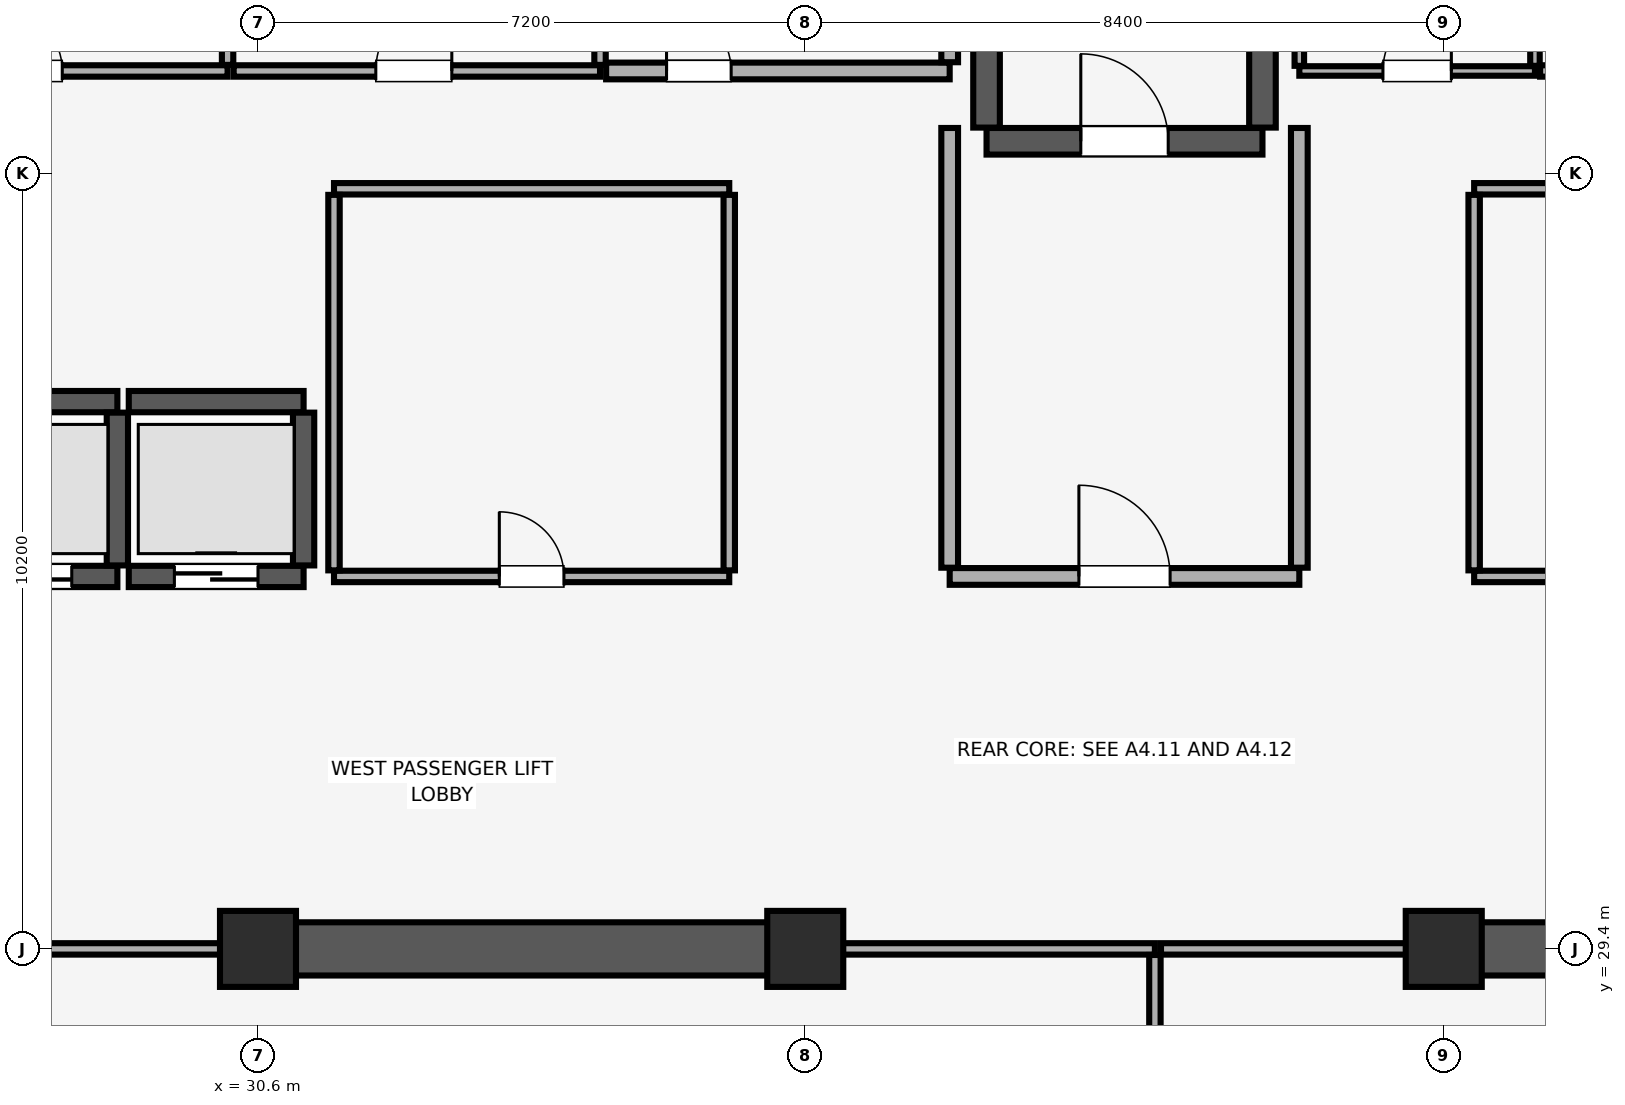
"""IFC4 building model, lengths in metres.
Left out: names, types, materials, properties, quantities, classifications, styles, units other than length and angle.
Written with IfcOpenShell. Run it as: python <this file> out.ifc"""

import sys

from ifc_helpers import new_model, si_unit, direction, frame, frame_2d, origin, origin_2d, place, context, subcontext, project, spatial, rectangle, extrude, element, fill, save


model = new_model("IFC4")
c1 = context("Model", 3, precision=1e-05, world=origin(), true_north=direction((0.0, 1.0)))
c2 = subcontext(c1, "Body", "Model", "MODEL_VIEW")
j1 = project(units=[si_unit("LENGTHUNIT", "METRE"), si_unit("PLANEANGLEUNIT", "RADIAN")], contexts=[c1])
p1 = place(None, origin())
s1 = spatial("IfcSite", under=j1, at=p1, CompositionType="ELEMENT")
p2 = place(p1, origin())
s2 = spatial("IfcBuilding", under=s1, at=p2, CompositionType="ELEMENT")
p3 = place(p2, frame((0.0, 0.0, 285.9)))
s3 = spatial("IfcBuildingStorey", under=s2, at=p3, CompositionType="ELEMENT", Elevation=285.9)
for number, where, z_axis, x_axis in (
    (1, (30.6, 29.4, 0.0), (0.0, 0.0, 1.0), (1.0, 0.0, 0.0)),
    (2, (37.8, 29.4, 0.0), (0.0, 0.0, 1.0), (1.0, 0.0, 0.0)),
    (3, (46.2, 29.4, 0.0), (0.0, 0.0, 1.0), (1.0, 0.0, 0.0)),
):
    element("IfcColumn", number, at=place(p3, frame(where, z_axis=z_axis, x_axis=x_axis)), inside=s3, PredefinedType="COLUMN", context=c2, shape_type="SweptSolid", body=[
        extrude(rectangle(XDim=1.0, YDim=1.0, at=origin_2d()), origin(), (0.0, 0.0, 1.0), 4.1),
    ])
for number, where, z_axis, x_axis in (
    (4, (30.4, 29.4, 0.0), (0.0, 0.0, 1.0), (1.0, 0.0, 0.0)),
    (5, (46.0, 29.4, 0.0), (0.0, 0.0, 1.0), (1.0, 0.0, 0.0)),
):
    element("IfcWall", number, at=place(p3, frame(where, z_axis=z_axis, x_axis=x_axis)), inside=s3, PredefinedType="SHEAR", context=c2, shape_type="SweptSolid", body=[
        extrude(rectangle(XDim=7.6, YDim=0.7, at=frame_2d((3.8, 0.0))), origin(), (0.0, 0.0, 1.0), 4.1),
    ])
p4 = place(p3, frame((40.185, 40.025, 0.0), z_axis=(0.0, 0.0, 1.0), x_axis=(1.0, 0.0, 0.0)))
e6 = element("IfcWall", 6, at=p4, inside=s3, PredefinedType="SHEAR", context=c2, shape_type="SweptSolid", body=[
    extrude(rectangle(XDim=3.63, YDim=0.35, at=frame_2d((1.815, 0.0))), origin(), (0.0, 0.0, 1.0), 4.1),
])
p5 = place(p4, frame((1.24, 0.0, 0.0)))
e7 = element("IfcOpeningElement", 7, at=p5, cuts=e6, PredefinedType="OPENING", context=c2, shape_type="SweptSolid", body=[
    extrude(rectangle(XDim=1.15, YDim=2.15, at=frame_2d((0.575, 1.075))), frame((0.0, 0.185, 0.0), z_axis=(0.0, -1.0, 0.0), x_axis=(1.0, 0.0, 0.0)), (0.0, 0.0, 1.0), 0.37),
])
for number, where, z_axis, x_axis in (
    (8, (40.185, 40.205, 0.0), (0.0, 0.0, 1.0), (0.0, 1.0, 0.0)),
    (9, (43.815, 40.205, 0.0), (0.0, 0.0, 1.0), (0.0, 1.0, 0.0)),
):
    element("IfcWall", number, at=place(p3, frame(where, z_axis=z_axis, x_axis=x_axis)), inside=s3, PredefinedType="SHEAR", context=c2, shape_type="SweptSolid", body=[
        extrude(rectangle(XDim=8.09, YDim=0.35, at=frame_2d((4.045, 0.0))), origin(), (0.0, 0.0, 1.0), 4.1),
    ])
p6 = place(p3, frame((26.45, 34.3, 0.0), z_axis=(0.0, 0.0, 1.0), x_axis=(1.0, 0.0, 0.0)))
e10 = element("IfcWall", 10, at=p6, inside=s3, PredefinedType="SHEAR", context=c2, shape_type="SweptSolid", body=[
    extrude(rectangle(XDim=2.3, YDim=0.28, at=frame_2d((1.15, 0.0))), origin(), (0.0, 0.0, 1.0), 4.1),
])
p7 = place(p6, frame((0.6, 0.0, 0.0)))
e11 = element("IfcOpeningElement", 11, at=p7, cuts=e10, PredefinedType="OPENING", context=c2, shape_type="SweptSolid", body=[
    extrude(rectangle(XDim=1.1, YDim=2.2, at=frame_2d((0.55, 1.1))), frame((0.0, 0.15, 0.0), z_axis=(0.0, -1.0, 0.0), x_axis=(1.0, 0.0, 0.0)), (0.0, 0.0, 1.0), 0.3),
])
p8 = place(p3, frame((26.45, 36.6, 0.0), z_axis=(0.0, 0.0, 1.0), x_axis=(1.0, 0.0, 0.0)))
e12 = element("IfcWall", 12, at=p8, inside=s3, PredefinedType="SHEAR", context=c2, shape_type="SweptSolid", body=[
    extrude(rectangle(XDim=2.3, YDim=0.28, at=frame_2d((1.15, 0.0))), origin(), (0.0, 0.0, 1.0), 4.1),
])
p9 = place(p3, frame((28.75, 34.445, 0.0), z_axis=(0.0, 0.0, 1.0), x_axis=(0.0, 1.0, 0.0)))
e13 = element("IfcWall", 13, at=p9, inside=s3, PredefinedType="SHEAR", context=c2, shape_type="SweptSolid", body=[
    extrude(rectangle(XDim=2.01, YDim=0.28, at=frame_2d((1.005, 0.0))), origin(), (0.0, 0.0, 1.0), 4.1),
])
p10 = place(p3, frame((28.9, 34.3, 0.0), z_axis=(0.0, 0.0, 1.0), x_axis=(1.0, 0.0, 0.0)))
e14 = element("IfcWall", 14, at=p10, inside=s3, PredefinedType="SHEAR", context=c2, shape_type="SweptSolid", body=[
    extrude(rectangle(XDim=2.3, YDim=0.28, at=frame_2d((1.15, 0.0))), origin(), (0.0, 0.0, 1.0), 4.1),
])
p11 = place(p10, frame((0.6, 0.0, 0.0)))
e15 = element("IfcOpeningElement", 15, at=p11, cuts=e14, PredefinedType="OPENING", context=c2, shape_type="SweptSolid", body=[
    extrude(rectangle(XDim=1.1, YDim=2.2, at=frame_2d((0.55, 1.1))), frame((0.0, 0.15, 0.0), z_axis=(0.0, -1.0, 0.0), x_axis=(1.0, 0.0, 0.0)), (0.0, 0.0, 1.0), 0.3),
])
p12 = place(p3, frame((28.9, 36.6, 0.0), z_axis=(0.0, 0.0, 1.0), x_axis=(1.0, 0.0, 0.0)))
e16 = element("IfcWall", 16, at=p12, inside=s3, PredefinedType="SHEAR", context=c2, shape_type="SweptSolid", body=[
    extrude(rectangle(XDim=2.3, YDim=0.28, at=frame_2d((1.15, 0.0))), origin(), (0.0, 0.0, 1.0), 4.1),
])
p13 = place(p3, frame((31.2, 34.445, 0.0), z_axis=(0.0, 0.0, 1.0), x_axis=(0.0, 1.0, 0.0)))
e17 = element("IfcWall", 17, at=p13, inside=s3, PredefinedType="SHEAR", context=c2, shape_type="SweptSolid", body=[
    extrude(rectangle(XDim=2.01, YDim=0.28, at=frame_2d((1.005, 0.0))), origin(), (0.0, 0.0, 1.0), 4.1),
])
p14 = place(p3, frame((39.7, 34.3, 0.0), z_axis=(0.0, 0.0, 1.0), x_axis=(1.0, 0.0, 0.0)))
e18 = element("IfcWall", 18, at=p14, inside=s3, PredefinedType="PARTITIONING", context=c2, shape_type="SweptSolid", body=[
    extrude(rectangle(XDim=4.6, YDim=0.22, at=frame_2d((2.3, 0.0))), origin(), (0.0, 0.0, 1.0), 4.1),
])
p15 = place(p14, frame((1.7, 0.0, 0.0)))
e19 = element("IfcOpeningElement", 19, at=p15, cuts=e18, PredefinedType="OPENING", context=c2, shape_type="SweptSolid", body=[
    extrude(rectangle(XDim=1.2, YDim=2.15, at=frame_2d((0.6, 1.075))), frame((0.0, 0.12, 0.0), z_axis=(0.0, -1.0, 0.0), x_axis=(1.0, 0.0, 0.0)), (0.0, 0.0, 1.0), 0.24),
])
for number, where, z_axis, x_axis in (
    (20, (39.7, 34.415, 0.0), (0.0, 0.0, 1.0), (0.0, 1.0, 0.0)),
    (21, (44.3, 34.415, 0.0), (0.0, 0.0, 1.0), (0.0, 1.0, 0.0)),
):
    element("IfcWall", number, at=place(p3, frame(where, z_axis=z_axis, x_axis=x_axis)), inside=s3, PredefinedType="PARTITIONING", context=c2, shape_type="SweptSolid", body=[
        extrude(rectangle(XDim=5.785, YDim=0.22, at=frame_2d((2.893, 0.0))), origin(), (0.0, 0.0, 1.0), 4.1),
    ])
p16 = place(p3, frame((31.6, 34.3, 0.0), z_axis=(0.0, 0.0, 1.0), x_axis=(1.0, 0.0, 0.0)))
e22 = element("IfcWall", 22, at=p16, inside=s3, PredefinedType="PARTITIONING", context=c2, shape_type="SweptSolid", body=[
    extrude(rectangle(XDim=5.2, YDim=0.15, at=frame_2d((2.6, 0.0))), origin(), (0.0, 0.0, 1.0), 4.1),
])
p17 = place(p16, frame((2.175, 0.0, 0.0)))
e23 = element("IfcOpeningElement", 23, at=p17, cuts=e22, PredefinedType="OPENING", context=c2, shape_type="SweptSolid", body=[
    extrude(rectangle(XDim=0.85, YDim=2.1, at=frame_2d((0.425, 1.05))), frame((0.0, 0.085, 0.0), z_axis=(0.0, -1.0, 0.0), x_axis=(1.0, 0.0, 0.0)), (0.0, 0.0, 1.0), 0.17),
])
p18 = place(p3, frame((31.6, 39.4, 0.0), z_axis=(0.0, 0.0, 1.0), x_axis=(1.0, 0.0, 0.0)))
e24 = element("IfcWall", 24, at=p18, inside=s3, PredefinedType="PARTITIONING", context=c2, shape_type="SweptSolid", body=[
    extrude(rectangle(XDim=5.2, YDim=0.15, at=frame_2d((2.6, 0.0))), origin(), (0.0, 0.0, 1.0), 4.1),
])
for number, where, z_axis, x_axis in (
    (25, (31.6, 34.38, 0.0), (0.0, 0.0, 1.0), (0.0, 1.0, 0.0)),
    (26, (36.8, 34.38, 0.0), (0.0, 0.0, 1.0), (0.0, 1.0, 0.0)),
):
    element("IfcWall", number, at=place(p3, frame(where, z_axis=z_axis, x_axis=x_axis)), inside=s3, PredefinedType="PARTITIONING", context=c2, shape_type="SweptSolid", body=[
        extrude(rectangle(XDim=4.94, YDim=0.15, at=frame_2d((2.47, 0.0))), origin(), (0.0, 0.0, 1.0), 4.1),
    ])
p19 = place(p3, frame((46.6, 34.3, 0.0), z_axis=(0.0, 0.0, 1.0), x_axis=(1.0, 0.0, 0.0)))
e27 = element("IfcWall", 27, at=p19, inside=s3, PredefinedType="PARTITIONING", context=c2, shape_type="SweptSolid", body=[
    extrude(rectangle(XDim=7.95, YDim=0.15, at=frame_2d((3.975, 0.0))), origin(), (0.0, 0.0, 1.0), 4.1),
])
p20 = place(p19, frame((3.4, 0.0, 0.0)))
e28 = element("IfcOpeningElement", 28, at=p20, cuts=e27, PredefinedType="OPENING", context=c2, shape_type="SweptSolid", body=[
    extrude(rectangle(XDim=1.0, YDim=2.15, at=frame_2d((0.5, 1.075))), frame((0.0, 0.085, 0.0), z_axis=(0.0, -1.0, 0.0), x_axis=(1.0, 0.0, 0.0)), (0.0, 0.0, 1.0), 0.17),
])
p21 = place(p3, frame((46.6, 39.4, 0.0), z_axis=(0.0, 0.0, 1.0), x_axis=(1.0, 0.0, 0.0)))
e29 = element("IfcWall", 29, at=p21, inside=s3, PredefinedType="PARTITIONING", context=c2, shape_type="SweptSolid", body=[
    extrude(rectangle(XDim=7.95, YDim=0.15, at=frame_2d((3.975, 0.0))), origin(), (0.0, 0.0, 1.0), 4.1),
])
p22 = place(p3, frame((46.6, 34.38, 0.0), z_axis=(0.0, 0.0, 1.0), x_axis=(0.0, 1.0, 0.0)))
e30 = element("IfcWall", 30, at=p22, inside=s3, PredefinedType="PARTITIONING", context=c2, shape_type="SweptSolid", body=[
    extrude(rectangle(XDim=4.94, YDim=0.15, at=frame_2d((2.47, 0.0))), origin(), (0.0, 0.0, 1.0), 4.1),
])
p23 = place(p3, frame((25.0, 40.95, 0.0), z_axis=(0.0, 0.0, 1.0), x_axis=(1.0, 0.0, 0.0)))
e31 = element("IfcWall", 31, at=p23, inside=s3, PredefinedType="PARTITIONING", context=c2, shape_type="SweptSolid", body=[
    extrude(rectangle(XDim=5.2, YDim=0.15, at=frame_2d((2.6, 0.0))), origin(), (0.0, 0.0, 1.0), 4.1),
])
p24 = place(p23, frame((2.175, 0.0, 0.0)))
e32 = element("IfcOpeningElement", 32, at=p24, cuts=e31, PredefinedType="OPENING", context=c2, shape_type="SweptSolid", body=[
    extrude(rectangle(XDim=0.85, YDim=2.1, at=frame_2d((0.425, 1.05))), frame((0.0, 0.085, 0.0), z_axis=(0.0, -1.0, 0.0), x_axis=(1.0, 0.0, 0.0)), (0.0, 0.0, 1.0), 0.17),
])
p25 = place(p3, frame((30.2, 41.03, 0.0), z_axis=(0.0, 0.0, 1.0), x_axis=(0.0, 1.0, 0.0)))
e33 = element("IfcWall", 33, at=p25, inside=s3, PredefinedType="PARTITIONING", context=c2, shape_type="SweptSolid", body=[
    extrude(rectangle(XDim=7.82, YDim=0.15, at=frame_2d((3.91, 0.0))), origin(), (0.0, 0.0, 1.0), 4.1),
])
p26 = place(p3, frame((30.28, 40.95, 0.0), z_axis=(0.0, 0.0, 1.0), x_axis=(1.0, 0.0, 0.0)))
e34 = element("IfcWall", 34, at=p26, inside=s3, PredefinedType="PARTITIONING", context=c2, shape_type="SweptSolid", body=[
    extrude(rectangle(XDim=4.82, YDim=0.15, at=frame_2d((2.41, 0.0))), origin(), (0.0, 0.0, 1.0), 4.1),
])
p27 = place(p26, frame((1.87, 0.0, 0.0)))
e35 = element("IfcOpeningElement", 35, at=p27, cuts=e34, PredefinedType="OPENING", context=c2, shape_type="SweptSolid", body=[
    extrude(rectangle(XDim=1.0, YDim=2.15, at=frame_2d((0.5, 1.075))), frame((0.0, 0.085, 0.0), z_axis=(0.0, -1.0, 0.0), x_axis=(1.0, 0.0, 0.0)), (0.0, 0.0, 1.0), 0.17),
])
p28 = place(p3, frame((35.1, 41.03, 0.0), z_axis=(0.0, 0.0, 1.0), x_axis=(0.0, 1.0, 0.0)))
e36 = element("IfcWall", 36, at=p28, inside=s3, PredefinedType="PARTITIONING", context=c2, shape_type="SweptSolid", body=[
    extrude(rectangle(XDim=7.82, YDim=0.15, at=frame_2d((3.91, 0.0))), origin(), (0.0, 0.0, 1.0), 4.1),
])
p29 = place(p3, frame((35.18, 40.95, 0.0), z_axis=(0.0, 0.0, 1.0), x_axis=(1.0, 0.0, 0.0)))
e37 = element("IfcWall", 37, at=p29, inside=s3, PredefinedType="PARTITIONING", context=c2, shape_type="SweptSolid", body=[
    extrude(rectangle(XDim=4.52, YDim=0.22, at=frame_2d((2.26, 0.0))), origin(), (0.0, 0.0, 1.0), 4.1),
])
p30 = place(p29, frame((0.795, 0.0, 0.0)))
e38 = element("IfcOpeningElement", 38, at=p30, cuts=e37, PredefinedType="OPENING", context=c2, shape_type="SweptSolid", body=[
    extrude(rectangle(XDim=0.85, YDim=2.1, at=frame_2d((0.425, 1.05))), frame((0.0, 0.12, 0.0), z_axis=(0.0, -1.0, 0.0), x_axis=(1.0, 0.0, 0.0)), (0.0, 0.0, 1.0), 0.24),
])
p31 = place(p3, frame((39.7, 41.065, 0.0), z_axis=(0.0, 0.0, 1.0), x_axis=(0.0, 1.0, 0.0)))
e39 = element("IfcWall", 39, at=p31, inside=s3, PredefinedType="PARTITIONING", context=c2, shape_type="SweptSolid", body=[
    extrude(rectangle(XDim=7.785, YDim=0.22, at=frame_2d((3.893, 0.0))), origin(), (0.0, 0.0, 1.0), 4.1),
])
p32 = place(p3, frame((44.3, 40.95, 0.0), z_axis=(0.0, 0.0, 1.0), x_axis=(1.0, 0.0, 0.0)))
e40 = element("IfcWall", 40, at=p32, inside=s3, PredefinedType="PARTITIONING", context=c2, shape_type="SweptSolid", body=[
    extrude(rectangle(XDim=3.1, YDim=0.125, at=frame_2d((1.55, 0.0))), origin(), (0.0, 0.0, 1.0), 4.1),
])
p33 = place(p32, frame((1.1, 0.0, 0.0)))
e41 = element("IfcOpeningElement", 41, at=p33, cuts=e40, PredefinedType="OPENING", context=c2, shape_type="SweptSolid", body=[
    extrude(rectangle(XDim=0.9, YDim=2.1, at=frame_2d((0.45, 1.05))), frame((0.0, 0.073, 0.0), z_axis=(0.0, -1.0, 0.0), x_axis=(1.0, 0.0, 0.0)), (0.0, 0.0, 1.0), 0.145),
])
for number, where, z_axis, x_axis in (
    (42, (44.3, 41.018, 0.0), (0.0, 0.0, 1.0), (0.0, 1.0, 0.0)),
    (43, (47.4, 41.018, 0.0), (0.0, 0.0, 1.0), (0.0, 1.0, 0.0)),
):
    element("IfcWall", number, at=place(p3, frame(where, z_axis=z_axis, x_axis=x_axis)), inside=s3, PredefinedType="PARTITIONING", context=c2, shape_type="SweptSolid", body=[
        extrude(rectangle(XDim=7.833, YDim=0.125, at=frame_2d((3.916, 0.0))), origin(), (0.0, 0.0, 1.0), 4.1),
    ])
p34 = place(p3, frame((47.468, 40.95, 0.0), z_axis=(0.0, 0.0, 1.0), x_axis=(1.0, 0.0, 0.0)))
e44 = element("IfcWall", 44, at=p34, inside=s3, PredefinedType="PARTITIONING", context=c2, shape_type="SweptSolid", body=[
    extrude(rectangle(XDim=4.932, YDim=0.15, at=frame_2d((2.466, 0.0))), origin(), (0.0, 0.0, 1.0), 4.1),
])
p35 = place(p34, frame((2.008, 0.0, 0.0)))
e45 = element("IfcOpeningElement", 45, at=p35, cuts=e44, PredefinedType="OPENING", context=c2, shape_type="SweptSolid", body=[
    extrude(rectangle(XDim=0.85, YDim=2.1, at=frame_2d((0.425, 1.05))), frame((0.0, 0.085, 0.0), z_axis=(0.0, -1.0, 0.0), x_axis=(1.0, 0.0, 0.0)), (0.0, 0.0, 1.0), 0.17),
])
p36 = place(p3, frame((27.0, 29.4, 0.0), z_axis=(0.0, 0.0, 1.0), x_axis=(1.0, 0.0, 0.0)))
e46 = element("IfcWall", 46, at=p36, inside=s3, PredefinedType="PARTITIONING", context=c2, shape_type="SweptSolid", body=[
    extrude(rectangle(XDim=3.39, YDim=0.15, at=frame_2d((1.695, 0.0))), origin(), (0.0, 0.0, 1.0), 3.0),
])
p37 = place(p3, frame((38.01, 29.4, 0.0), z_axis=(0.0, 0.0, 1.0), x_axis=(1.0, 0.0, 0.0)))
e47 = element("IfcWall", 47, at=p37, inside=s3, PredefinedType="PARTITIONING", context=c2, shape_type="SweptSolid", body=[
    extrude(rectangle(XDim=4.39, YDim=0.15, at=frame_2d((2.195, 0.0))), origin(), (0.0, 0.0, 1.0), 3.0),
])
p38 = place(p3, frame((42.4, 20.88, 0.0), z_axis=(0.0, 0.0, 1.0), x_axis=(0.0, 1.0, 0.0)))
e48 = element("IfcWall", 48, at=p38, inside=s3, PredefinedType="PARTITIONING", context=c2, shape_type="SweptSolid", body=[
    extrude(rectangle(XDim=8.44, YDim=0.15, at=frame_2d((4.22, 0.0))), origin(), (0.0, 0.0, 1.0), 4.1),
])
p39 = place(p3, frame((42.48, 29.4, 0.0), z_axis=(0.0, 0.0, 1.0), x_axis=(1.0, 0.0, 0.0)))
e49 = element("IfcWall", 49, at=p39, inside=s3, PredefinedType="PARTITIONING", context=c2, shape_type="SweptSolid", body=[
    extrude(rectangle(XDim=3.51, YDim=0.15, at=frame_2d((1.755, 0.0))), origin(), (0.0, 0.0, 1.0), 3.0),
])
p40 = place(p5, origin())
e50 = element("IfcDoor", 50, at=p40, inside=s3, OperationType="SINGLE_SWING_LEFT", PredefinedType="DOOR", context=c2, shape_type="SweptSolid", body=[
    extrude(rectangle(XDim=1.15, YDim=2.15, at=frame_2d((0.575, 1.075))), frame((0.0, 0.025, 0.0), z_axis=(0.0, -1.0, 0.0), x_axis=(1.0, 0.0, 0.0)), (0.0, 0.0, 1.0), 0.05),
])
fill(e7, e50)
p41 = place(p7, origin())
e51 = element("IfcDoor", 51, at=p41, inside=s3, OperationType="DOUBLE_DOOR_SLIDING", PredefinedType="DOOR", context=c2, shape_type="SweptSolid", body=[
    extrude(rectangle(XDim=1.1, YDim=2.2, at=frame_2d((0.55, 1.1))), frame((0.0, 0.025, 0.0), z_axis=(0.0, -1.0, 0.0), x_axis=(1.0, 0.0, 0.0)), (0.0, 0.0, 1.0), 0.05),
])
fill(e11, e51)
p42 = place(p11, origin())
e52 = element("IfcDoor", 52, at=p42, inside=s3, OperationType="DOUBLE_DOOR_SLIDING", PredefinedType="DOOR", context=c2, shape_type="SweptSolid", body=[
    extrude(rectangle(XDim=1.1, YDim=2.2, at=frame_2d((0.55, 1.1))), frame((0.0, 0.025, 0.0), z_axis=(0.0, -1.0, 0.0), x_axis=(1.0, 0.0, 0.0)), (0.0, 0.0, 1.0), 0.05),
])
fill(e15, e52)
p43 = place(p15, origin())
e53 = element("IfcDoor", 53, at=p43, inside=s3, OperationType="SINGLE_SWING_LEFT", PredefinedType="DOOR", context=c2, shape_type="SweptSolid", body=[
    extrude(rectangle(XDim=1.2, YDim=2.15, at=frame_2d((0.6, 1.075))), frame((0.0, 0.025, 0.0), z_axis=(0.0, -1.0, 0.0), x_axis=(1.0, 0.0, 0.0)), (0.0, 0.0, 1.0), 0.05),
])
fill(e19, e53)
p44 = place(p17, origin())
e54 = element("IfcDoor", 54, at=p44, inside=s3, OperationType="SINGLE_SWING_LEFT", PredefinedType="DOOR", context=c2, shape_type="SweptSolid", body=[
    extrude(rectangle(XDim=0.85, YDim=2.1, at=frame_2d((0.425, 1.05))), frame((0.0, 0.025, 0.0), z_axis=(0.0, -1.0, 0.0), x_axis=(1.0, 0.0, 0.0)), (0.0, 0.0, 1.0), 0.05),
])
fill(e23, e54)
p45 = place(p24, origin())
e55 = element("IfcDoor", 55, at=p45, inside=s3, OperationType="SINGLE_SWING_LEFT", PredefinedType="DOOR", context=c2, shape_type="SweptSolid", body=[
    extrude(rectangle(XDim=0.85, YDim=2.1, at=frame_2d((0.425, 1.05))), frame((0.0, 0.025, 0.0), z_axis=(0.0, -1.0, 0.0), x_axis=(1.0, 0.0, 0.0)), (0.0, 0.0, 1.0), 0.05),
])
fill(e32, e55)
p46 = place(p27, origin())
e56 = element("IfcDoor", 56, at=p46, inside=s3, OperationType="SINGLE_SWING_RIGHT", PredefinedType="DOOR", context=c2, shape_type="SweptSolid", body=[
    extrude(rectangle(XDim=1.0, YDim=2.15, at=frame_2d((0.5, 1.075))), frame((0.0, 0.025, 0.0), z_axis=(0.0, -1.0, 0.0), x_axis=(1.0, 0.0, 0.0)), (0.0, 0.0, 1.0), 0.05),
])
fill(e35, e56)
p47 = place(p30, origin())
e57 = element("IfcDoor", 57, at=p47, inside=s3, OperationType="SINGLE_SWING_LEFT", PredefinedType="DOOR", context=c2, shape_type="SweptSolid", body=[
    extrude(rectangle(XDim=0.85, YDim=2.1, at=frame_2d((0.425, 1.05))), frame((0.0, 0.025, 0.0), z_axis=(0.0, -1.0, 0.0), x_axis=(1.0, 0.0, 0.0)), (0.0, 0.0, 1.0), 0.05),
])
fill(e38, e57)
p48 = place(p33, origin())
e58 = element("IfcDoor", 58, at=p48, inside=s3, OperationType="SINGLE_SWING_RIGHT", PredefinedType="DOOR", context=c2, shape_type="SweptSolid", body=[
    extrude(rectangle(XDim=0.9, YDim=2.1, at=frame_2d((0.45, 1.05))), frame((0.0, 0.025, 0.0), z_axis=(0.0, -1.0, 0.0), x_axis=(1.0, 0.0, 0.0)), (0.0, 0.0, 1.0), 0.05),
])
fill(e41, e58)
save(model, sys.argv[1])
